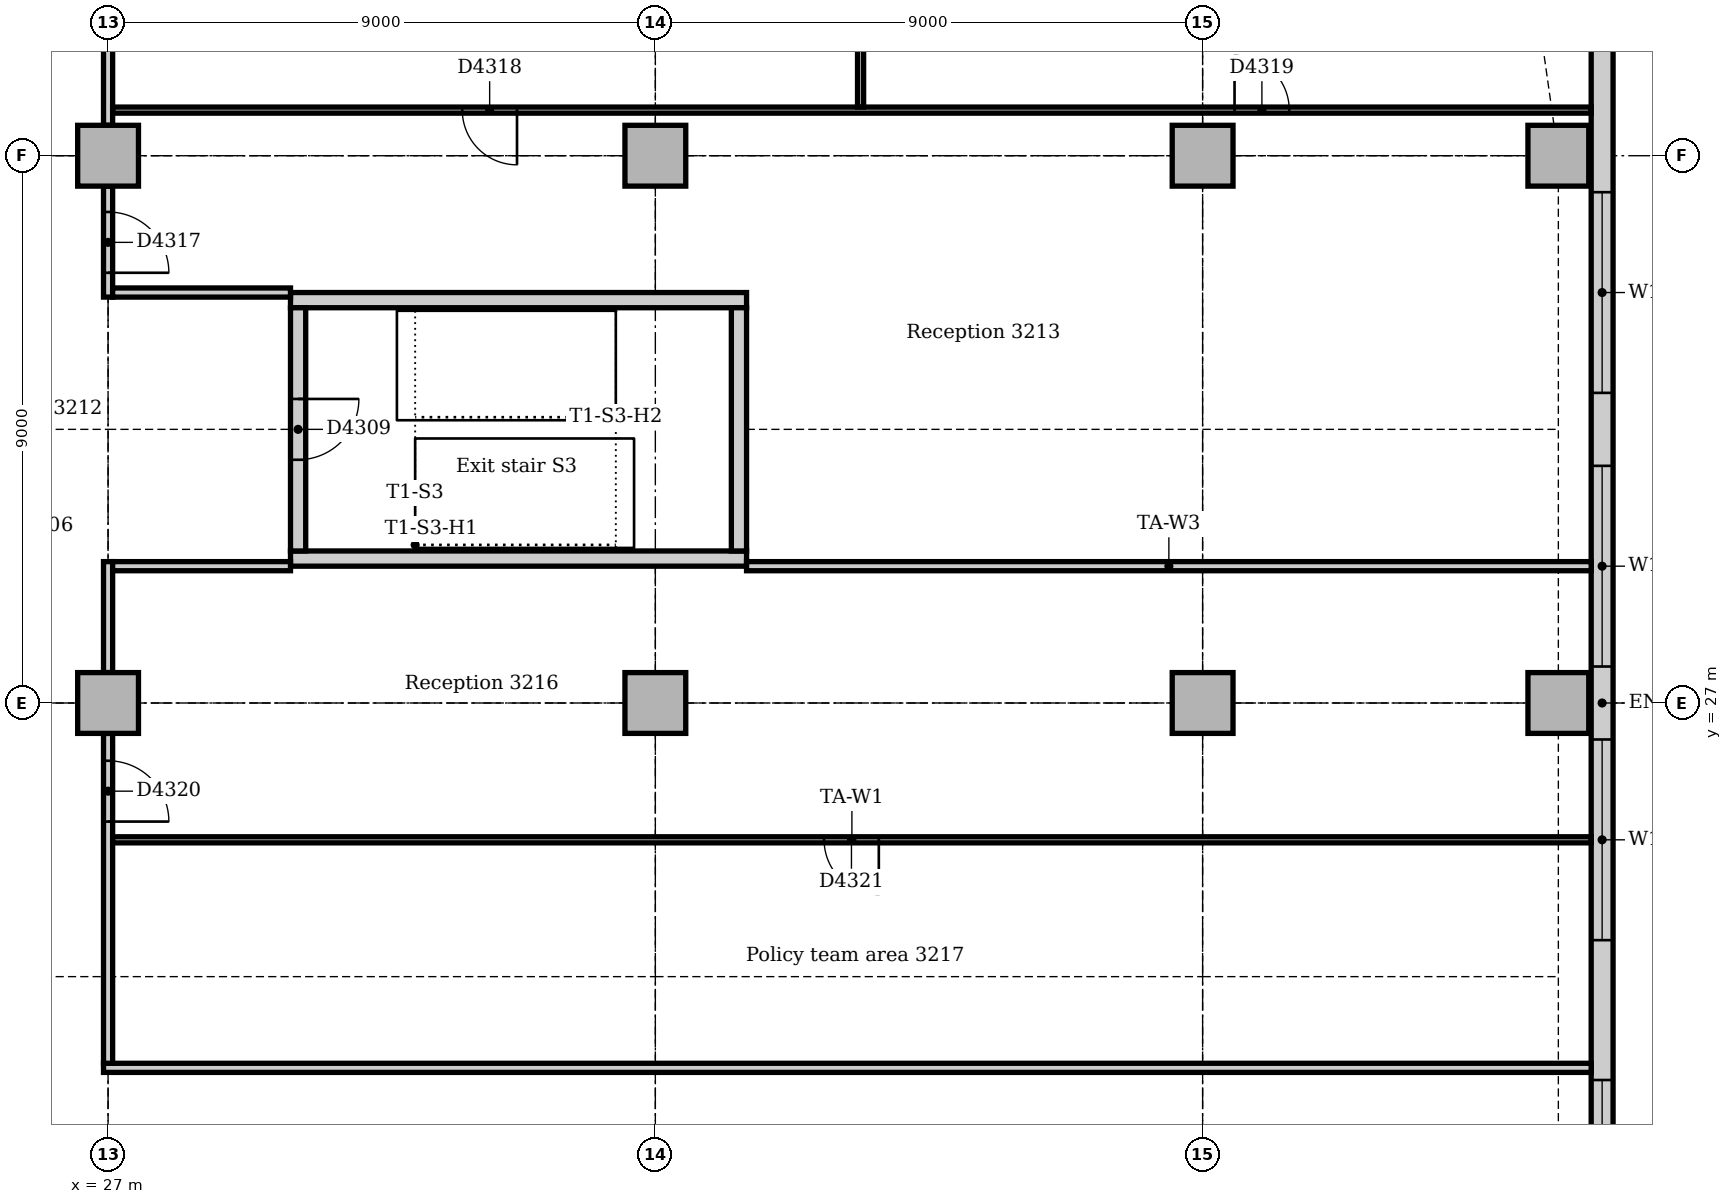
"""IFC4 building model, lengths in metres.
Left out: names, types, materials, properties, quantities, classifications, styles, units other than length and angle.
Written with IfcOpenShell. Run it as: python <this file> out.ifc"""

import sys

from ifc_helpers import new_model, si_unit, direction, frame, frame_2d, origin, origin_2d, place, context, subcontext, project, spatial, rectangle, extrude, element, fill, save


model = new_model("IFC4")
c1 = context("Model", 3, precision=1e-05, world=origin(), true_north=direction((0.0, 1.0)))
c2 = subcontext(c1, "Body", "Model", "MODEL_VIEW")
j1 = project(units=[si_unit("LENGTHUNIT", "METRE"), si_unit("PLANEANGLEUNIT", "RADIAN")], contexts=[c1])
p1 = place(None, origin())
s1 = spatial("IfcSite", under=j1, at=p1, CompositionType="ELEMENT")
p2 = place(p1, origin())
s2 = spatial("IfcBuilding", under=s1, at=p2, CompositionType="ELEMENT")
p3 = place(p2, frame((0.0, 0.0, 136.0)))
s3 = spatial("IfcBuildingStorey", under=s2, at=p3, CompositionType="ELEMENT", Elevation=136.0)
for number, where, z_axis, x_axis in (
    (1, (30.0, 29.375, 0.0), (0.0, 0.0, 1.0), (1.0, 0.0, 0.0)),
    (2, (37.5, 33.625, 0.0), (0.0, 0.0, 1.0), (-1.0, 0.0, 0.0)),
):
    element("IfcWall", number, at=place(p3, frame(where, z_axis=z_axis, x_axis=x_axis)), inside=s3, PredefinedType="SOLIDWALL", context=c2, shape_type="SweptSolid", body=[
        extrude(rectangle(XDim=7.5, YDim=0.25, at=frame_2d((3.75, 0.0))), origin(), (0.0, 0.0, 1.0), 4.0),
    ])
p4 = place(p3, frame((37.375, 29.5, 0.0), z_axis=(0.0, 0.0, 1.0), x_axis=(0.0, 1.0, 0.0)))
e3 = element("IfcWall", 3, at=p4, inside=s3, PredefinedType="SOLIDWALL", context=c2, shape_type="SweptSolid", body=[
    extrude(rectangle(XDim=4.0, YDim=0.25, at=frame_2d((2.0, 0.0))), origin(), (0.0, 0.0, 1.0), 4.0),
])
p5 = place(p3, frame((30.125, 33.5, 0.0), z_axis=(0.0, 0.0, 1.0), x_axis=(0.0, -1.0, 0.0)))
e4 = element("IfcWall", 4, at=p5, inside=s3, PredefinedType="SOLIDWALL", context=c2, shape_type="SweptSolid", body=[
    extrude(rectangle(XDim=4.0, YDim=0.25, at=frame_2d((2.0, 0.0))), origin(), (0.0, 0.0, 1.0), 4.0),
])
p6 = place(p5, frame((1.5, 0.0, 0.0)))
e5 = element("IfcOpeningElement", 5, at=p6, cuts=e4, PredefinedType="OPENING", context=c2, shape_type="SweptSolid", body=[
    extrude(rectangle(XDim=1.0, YDim=2.1, at=frame_2d((0.5, 1.05))), frame((0.0, 0.135, 0.0), z_axis=(0.0, -1.0, 0.0), x_axis=(1.0, 0.0, 0.0)), (0.0, 0.0, 1.0), 0.27),
])
for number, where, z_axis, x_axis in (
    (6, (50.85, 27.0, 0.0), (0.0, 0.0, 1.0), (1.0, 0.0, 0.0)),
    (7, (50.85, 36.0, 0.0), (0.0, 0.0, 1.0), (1.0, 0.0, 0.0)),
    (8, (27.0, 27.0, 0.0), (0.0, 0.0, 1.0), (1.0, 0.0, 0.0)),
    (9, (27.0, 36.0, 0.0), (0.0, 0.0, 1.0), (1.0, 0.0, 0.0)),
    (10, (36.0, 27.0, 0.0), (0.0, 0.0, 1.0), (1.0, 0.0, 0.0)),
    (11, (36.0, 36.0, 0.0), (0.0, 0.0, 1.0), (1.0, 0.0, 0.0)),
    (12, (45.0, 27.0, 0.0), (0.0, 0.0, 1.0), (1.0, 0.0, 0.0)),
    (13, (45.0, 36.0, 0.0), (0.0, 0.0, 1.0), (1.0, 0.0, 0.0)),
):
    element("IfcColumn", number, at=place(p3, frame(where, z_axis=z_axis, x_axis=x_axis)), inside=s3, PredefinedType="COLUMN", context=c2, shape_type="SweptSolid", body=[
        extrude(rectangle(XDim=1.0, YDim=1.0, at=origin_2d()), origin(), (0.0, 0.0, 1.0), 3.85),
    ])
p7 = place(p3, frame((51.57, 14.743, 0.0), z_axis=(0.0, 0.0, 1.0), x_axis=(0.0, 1.0, 0.0)))
e14 = element("IfcWall", 14, at=p7, inside=s3, PredefinedType="STANDARD", context=c2, shape_type="SweptSolid", body=[
    extrude(rectangle(XDim=24.515, YDim=0.36, at=frame_2d((12.257, 0.0))), origin(), (0.0, 0.0, 1.0), 3.85),
])
p8 = place(p7, frame((4.257, 0.0, 0.9)))
e15 = element("IfcOpeningElement", 15, at=p8, cuts=e14, PredefinedType="OPENING", context=c2, shape_type="SweptSolid", body=[
    extrude(rectangle(XDim=1.8, YDim=1.6, at=frame_2d((0.9, 0.8))), frame((0.0, 0.19, 0.0), z_axis=(0.0, -1.0, 0.0), x_axis=(1.0, 0.0, 0.0)), (0.0, 0.0, 1.0), 0.38),
])
p9 = place(p7, frame((8.357, 0.0, 0.9)))
e16 = element("IfcOpeningElement", 16, at=p9, cuts=e14, PredefinedType="OPENING", context=c2, shape_type="SweptSolid", body=[
    extrude(rectangle(XDim=3.3, YDim=1.6, at=frame_2d((1.65, 0.8))), frame((0.0, 0.19, 0.0), z_axis=(0.0, -1.0, 0.0), x_axis=(1.0, 0.0, 0.0)), (0.0, 0.0, 1.0), 0.38),
])
p10 = place(p7, frame((12.857, 0.0, 0.9)))
e17 = element("IfcOpeningElement", 17, at=p10, cuts=e14, PredefinedType="OPENING", context=c2, shape_type="SweptSolid", body=[
    extrude(rectangle(XDim=3.3, YDim=1.6, at=frame_2d((1.65, 0.8))), frame((0.0, 0.19, 0.0), z_axis=(0.0, -1.0, 0.0), x_axis=(1.0, 0.0, 0.0)), (0.0, 0.0, 1.0), 0.38),
])
p11 = place(p7, frame((17.357, 0.0, 0.9)))
e18 = element("IfcOpeningElement", 18, at=p11, cuts=e14, PredefinedType="OPENING", context=c2, shape_type="SweptSolid", body=[
    extrude(rectangle(XDim=3.3, YDim=1.6, at=frame_2d((1.65, 0.8))), frame((0.0, 0.19, 0.0), z_axis=(0.0, -1.0, 0.0), x_axis=(1.0, 0.0, 0.0)), (0.0, 0.0, 1.0), 0.38),
])
p12 = place(p3, frame((26.925, 21.0, 0.0), z_axis=(0.0, 0.0, 1.0), x_axis=(1.0, 0.0, 0.0)))
e19 = element("IfcWall", 19, at=p12, inside=s3, PredefinedType="PARTITIONING", context=c2, shape_type="SweptSolid", body=[
    extrude(rectangle(XDim=24.465, YDim=0.15, at=frame_2d((12.232, 0.0))), origin(), (0.0, 0.0, 1.0), 3.85),
])
p13 = place(p3, frame((27.0, 33.675, 0.0), z_axis=(0.0, 0.0, 1.0), x_axis=(0.0, 1.0, 0.0)))
e20 = element("IfcWall", 20, at=p13, inside=s3, PredefinedType="PARTITIONING", context=c2, shape_type="SweptSolid", body=[
    extrude(rectangle(XDim=1.825, YDim=0.15, at=frame_2d((0.912, 0.0))), origin(), (0.0, 0.0, 1.0), 3.256),
])
p14 = place(p13, frame((0.4, 0.0, 0.0)))
e21 = element("IfcOpeningElement", 21, at=p14, cuts=e20, PredefinedType="OPENING", context=c2, shape_type="SweptSolid", body=[
    extrude(rectangle(XDim=1.0, YDim=2.1, at=frame_2d((0.5, 1.05))), frame((0.0, 0.085, 0.0), z_axis=(0.0, -1.0, 0.0), x_axis=(1.0, 0.0, 0.0)), (0.0, 0.0, 1.0), 0.17),
])
p15 = place(p3, frame((27.0, 36.5, 0.0), z_axis=(0.0, 0.0, 1.0), x_axis=(0.0, 1.0, 0.0)))
e22 = element("IfcWall", 22, at=p15, inside=s3, PredefinedType="PARTITIONING", context=c2, shape_type="SweptSolid", body=[
    extrude(rectangle(XDim=7.1, YDim=0.15, at=frame_2d((3.55, 0.0))), origin(), (0.0, 0.0, 1.0), 3.256),
])
p16 = place(p3, frame((27.0, 21.075, 0.0), z_axis=(0.0, 0.0, 1.0), x_axis=(0.0, 1.0, 0.0)))
e23 = element("IfcWall", 23, at=p16, inside=s3, PredefinedType="PARTITIONING", context=c2, shape_type="SweptSolid", body=[
    extrude(rectangle(XDim=5.425, YDim=0.15, at=frame_2d((2.712, 0.0))), origin(), (0.0, 0.0, 1.0), 3.256),
])
p17 = place(p16, frame((3.975, 0.0, 0.0)))
e24 = element("IfcOpeningElement", 24, at=p17, cuts=e23, PredefinedType="OPENING", context=c2, shape_type="SweptSolid", body=[
    extrude(rectangle(XDim=1.0, YDim=2.1, at=frame_2d((0.5, 1.05))), frame((0.0, 0.085, 0.0), z_axis=(0.0, -1.0, 0.0), x_axis=(1.0, 0.0, 0.0)), (0.0, 0.0, 1.0), 0.17),
])
p18 = place(p3, frame((27.0, 27.5, 0.0), z_axis=(0.0, 0.0, 1.0), x_axis=(0.0, 1.0, 0.0)))
e25 = element("IfcWall", 25, at=p18, inside=s3, PredefinedType="PARTITIONING", context=c2, shape_type="SweptSolid", body=[
    extrude(rectangle(XDim=1.825, YDim=0.15, at=frame_2d((0.912, 0.0))), origin(), (0.0, 0.0, 1.0), 3.256),
])
for number, where, z_axis, x_axis in (
    (26, (27.075, 29.25, 0.0), (0.0, 0.0, 1.0), (1.0, 0.0, 0.0)),
    (27, (27.075, 33.75, 0.0), (0.0, 0.0, 1.0), (1.0, 0.0, 0.0)),
):
    element("IfcWall", number, at=place(p3, frame(where, z_axis=z_axis, x_axis=x_axis)), inside=s3, PredefinedType="PARTITIONING", context=c2, shape_type="SweptSolid", body=[
        extrude(rectangle(XDim=2.925, YDim=0.15, at=frame_2d((1.462, 0.0))), origin(), (0.0, 0.0, 1.0), 3.85),
    ])
p19 = place(p3, frame((37.5, 29.25, 0.0), z_axis=(0.0, 0.0, 1.0), x_axis=(1.0, 0.0, 0.0)))
e28 = element("IfcWall", 28, at=p19, inside=s3, PredefinedType="PARTITIONING", context=c2, shape_type="SweptSolid", body=[
    extrude(rectangle(XDim=13.89, YDim=0.15, at=frame_2d((6.945, 0.0))), origin(), (0.0, 0.0, 1.0), 3.85),
])
p20 = place(p3, frame((27.075, 24.75, 0.0), z_axis=(0.0, 0.0, 1.0), x_axis=(1.0, 0.0, 0.0)))
e29 = element("IfcWall", 29, at=p20, inside=s3, PredefinedType="PARTITIONING", context=c2, shape_type="SweptSolid", body=[
    extrude(rectangle(XDim=24.315, YDim=0.1, at=frame_2d((12.158, 0.0))), origin(), (0.0, 0.0, 1.0), 3.85),
])
p21 = place(p20, frame((11.7, 0.0, 0.0)))
e30 = element("IfcOpeningElement", 30, at=p21, cuts=e29, PredefinedType="OPENING", context=c2, shape_type="SweptSolid", body=[
    extrude(rectangle(XDim=0.9, YDim=2.1, at=frame_2d((0.45, 1.05))), frame((0.0, 0.06, 0.0), z_axis=(0.0, -1.0, 0.0), x_axis=(1.0, 0.0, 0.0)), (0.0, 0.0, 1.0), 0.12),
])
p22 = place(p3, frame((27.075, 36.75, 0.0), z_axis=(0.0, 0.0, 1.0), x_axis=(1.0, 0.0, 0.0)))
e31 = element("IfcWall", 31, at=p22, inside=s3, PredefinedType="PARTITIONING", context=c2, shape_type="SweptSolid", body=[
    extrude(rectangle(XDim=24.315, YDim=0.1, at=frame_2d((12.158, 0.0))), origin(), (0.0, 0.0, 1.0), 3.85),
])
p23 = place(p22, frame((5.75, 0.0, 0.0)))
e32 = element("IfcOpeningElement", 32, at=p23, cuts=e31, PredefinedType="OPENING", context=c2, shape_type="SweptSolid", body=[
    extrude(rectangle(XDim=0.9, YDim=2.1, at=frame_2d((0.45, 1.05))), frame((0.0, 0.06, 0.0), z_axis=(0.0, -1.0, 0.0), x_axis=(1.0, 0.0, 0.0)), (0.0, 0.0, 1.0), 0.12),
])
p24 = place(p22, frame((18.45, 0.0, 0.0)))
e33 = element("IfcOpeningElement", 33, at=p24, cuts=e31, PredefinedType="OPENING", context=c2, shape_type="SweptSolid", body=[
    extrude(rectangle(XDim=0.9, YDim=2.1, at=frame_2d((0.45, 1.05))), frame((0.0, 0.06, 0.0), z_axis=(0.0, -1.0, 0.0), x_axis=(1.0, 0.0, 0.0)), (0.0, 0.0, 1.0), 0.12),
])
p25 = place(p3, frame((39.375, 36.8, 0.0), z_axis=(0.0, 0.0, 1.0), x_axis=(0.0, 1.0, 0.0)))
e34 = element("IfcWall", 34, at=p25, inside=s3, PredefinedType="PARTITIONING", context=c2, shape_type="SweptSolid", body=[
    extrude(rectangle(XDim=12.34, YDim=0.1, at=frame_2d((6.17, 0.0))), origin(), (0.0, 0.0, 1.0), 3.85),
])
p26 = place(p8, origin())
e35 = element("IfcWindow", 35, at=p26, inside=s3, PartitioningType="SINGLE_PANEL", PredefinedType="WINDOW", context=c2, shape_type="SweptSolid", body=[
    extrude(rectangle(XDim=1.8, YDim=1.6, at=frame_2d((0.9, 0.8))), frame((0.0, 0.13, 0.0), z_axis=(0.0, -1.0, 0.0), x_axis=(1.0, 0.0, 0.0)), (0.0, 0.0, 1.0), 0.06),
])
fill(e15, e35)
p27 = place(p9, origin())
e36 = element("IfcWindow", 36, at=p27, inside=s3, PartitioningType="SINGLE_PANEL", PredefinedType="WINDOW", context=c2, shape_type="SweptSolid", body=[
    extrude(rectangle(XDim=3.3, YDim=1.6, at=frame_2d((1.65, 0.8))), frame((0.0, 0.13, 0.0), z_axis=(0.0, -1.0, 0.0), x_axis=(1.0, 0.0, 0.0)), (0.0, 0.0, 1.0), 0.06),
])
fill(e16, e36)
p28 = place(p10, origin())
e37 = element("IfcWindow", 37, at=p28, inside=s3, PartitioningType="SINGLE_PANEL", PredefinedType="WINDOW", context=c2, shape_type="SweptSolid", body=[
    extrude(rectangle(XDim=3.3, YDim=1.6, at=frame_2d((1.65, 0.8))), frame((0.0, 0.13, 0.0), z_axis=(0.0, -1.0, 0.0), x_axis=(1.0, 0.0, 0.0)), (0.0, 0.0, 1.0), 0.06),
])
fill(e17, e37)
p29 = place(p11, origin())
e38 = element("IfcWindow", 38, at=p29, inside=s3, PartitioningType="SINGLE_PANEL", PredefinedType="WINDOW", context=c2, shape_type="SweptSolid", body=[
    extrude(rectangle(XDim=3.3, YDim=1.6, at=frame_2d((1.65, 0.8))), frame((0.0, 0.13, 0.0), z_axis=(0.0, -1.0, 0.0), x_axis=(1.0, 0.0, 0.0)), (0.0, 0.0, 1.0), 0.06),
])
fill(e18, e38)
p30 = place(p6, origin())
e39 = element("IfcDoor", 39, at=p30, inside=s3, OperationType="SINGLE_SWING_LEFT", PredefinedType="DOOR", context=c2, shape_type="SweptSolid", body=[
    extrude(rectangle(XDim=1.0, YDim=2.1, at=frame_2d((0.5, 1.05))), frame((0.0, 0.025, 0.0), z_axis=(0.0, -1.0, 0.0), x_axis=(1.0, 0.0, 0.0)), (0.0, 0.0, 1.0), 0.05),
])
fill(e5, e39)
p31 = place(p14, frame((1.0, 0.0, 0.0), z_axis=(0.0, 0.0, 1.0), x_axis=(-1.0, 0.0, 0.0)))
e40 = element("IfcDoor", 40, at=p31, inside=s3, OperationType="SINGLE_SWING_RIGHT", PredefinedType="DOOR", context=c2, shape_type="SweptSolid", body=[
    extrude(rectangle(XDim=1.0, YDim=2.1, at=frame_2d((0.5, 1.05))), frame((0.0, 0.025, 0.0), z_axis=(0.0, -1.0, 0.0), x_axis=(1.0, 0.0, 0.0)), (0.0, 0.0, 1.0), 0.05),
])
fill(e21, e40)
p32 = place(p23, frame((0.9, 0.0, 0.0), z_axis=(0.0, 0.0, 1.0), x_axis=(-1.0, 0.0, 0.0)))
e41 = element("IfcDoor", 41, at=p32, inside=s3, OperationType="SINGLE_SWING_LEFT", PredefinedType="DOOR", context=c2, shape_type="SweptSolid", body=[
    extrude(rectangle(XDim=0.9, YDim=2.1, at=frame_2d((0.45, 1.05))), frame((0.0, 0.025, 0.0), z_axis=(0.0, -1.0, 0.0), x_axis=(1.0, 0.0, 0.0)), (0.0, 0.0, 1.0), 0.05),
])
fill(e32, e41)
p33 = place(p24, origin())
e42 = element("IfcDoor", 42, at=p33, inside=s3, OperationType="SINGLE_SWING_LEFT", PredefinedType="DOOR", context=c2, shape_type="SweptSolid", body=[
    extrude(rectangle(XDim=0.9, YDim=2.1, at=frame_2d((0.45, 1.05))), frame((0.0, 0.025, 0.0), z_axis=(0.0, -1.0, 0.0), x_axis=(1.0, 0.0, 0.0)), (0.0, 0.0, 1.0), 0.05),
])
fill(e33, e42)
p34 = place(p17, frame((1.0, 0.0, 0.0), z_axis=(0.0, 0.0, 1.0), x_axis=(-1.0, 0.0, 0.0)))
e43 = element("IfcDoor", 43, at=p34, inside=s3, OperationType="SINGLE_SWING_RIGHT", PredefinedType="DOOR", context=c2, shape_type="SweptSolid", body=[
    extrude(rectangle(XDim=1.0, YDim=2.1, at=frame_2d((0.5, 1.05))), frame((0.0, 0.025, 0.0), z_axis=(0.0, -1.0, 0.0), x_axis=(1.0, 0.0, 0.0)), (0.0, 0.0, 1.0), 0.05),
])
fill(e24, e43)
p35 = place(p21, frame((0.9, 0.0, 0.0), z_axis=(0.0, 0.0, 1.0), x_axis=(-1.0, 0.0, 0.0)))
e44 = element("IfcDoor", 44, at=p35, inside=s3, OperationType="SINGLE_SWING_LEFT", PredefinedType="DOOR", context=c2, shape_type="SweptSolid", body=[
    extrude(rectangle(XDim=0.9, YDim=2.1, at=frame_2d((0.45, 1.05))), frame((0.0, 0.025, 0.0), z_axis=(0.0, -1.0, 0.0), x_axis=(1.0, 0.0, 0.0)), (0.0, 0.0, 1.0), 0.05),
])
fill(e30, e44)
save(model, sys.argv[1])
